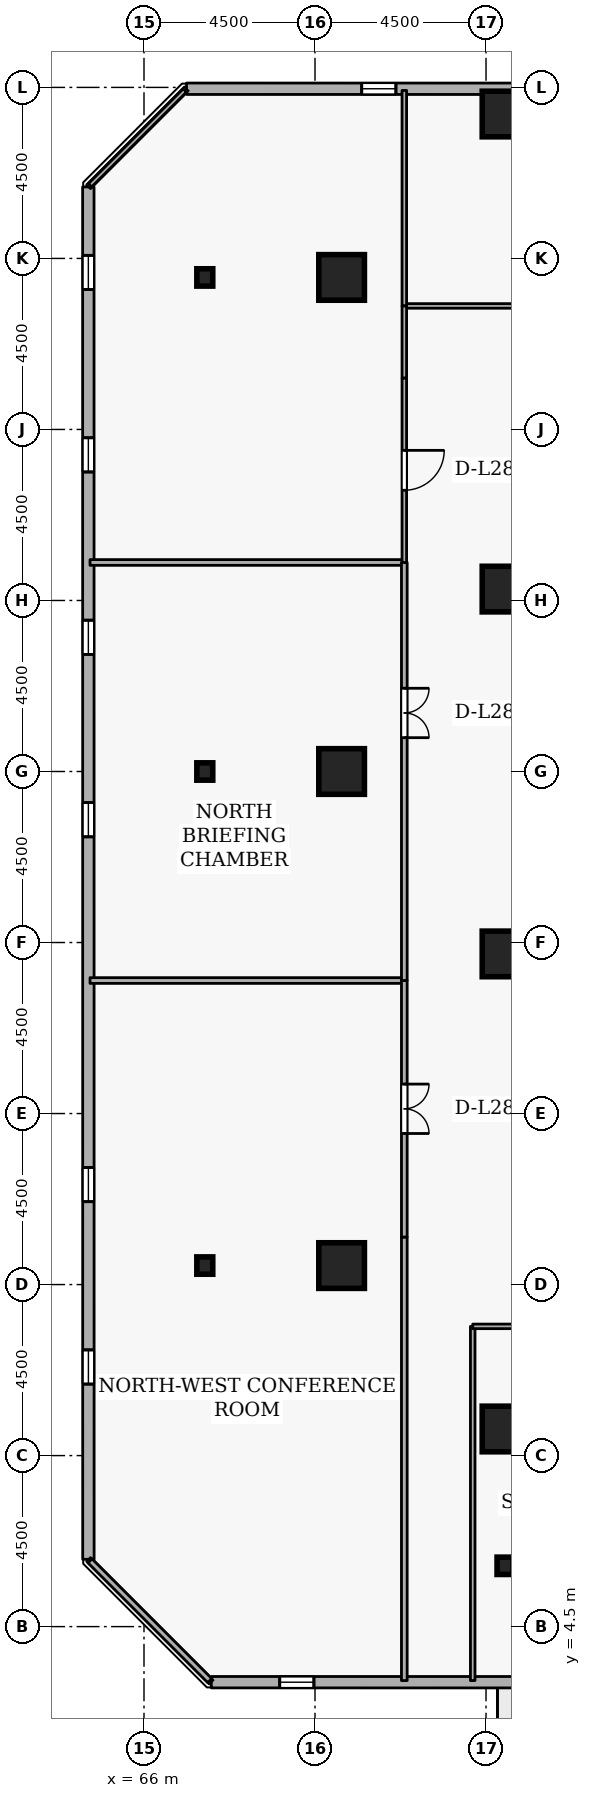
"""IFC4 building model, lengths in metres.
Left out: names, types, materials, properties, quantities, classifications, styles, units other than length and angle.
Written with IfcOpenShell. Run it as: python <this file> out.ifc"""

import sys

from ifc_helpers import new_model, si_unit, direction, frame, frame_2d, origin, origin_2d, place, context, subcontext, project, spatial, rectangle, i_section, extrude, element, fill, save


model = new_model("IFC4")
c1 = context("Model", 3, precision=1e-05, world=origin(), true_north=direction((0.0, 1.0)))
c2 = subcontext(c1, "Body", "Model", "MODEL_VIEW")
j1 = project(units=[si_unit("LENGTHUNIT", "METRE"), si_unit("PLANEANGLEUNIT", "RADIAN")], contexts=[c1])
p1 = place(None, origin())
s1 = spatial("IfcSite", under=j1, at=p1, CompositionType="ELEMENT")
p2 = place(p1, origin())
s2 = spatial("IfcBuilding", under=s1, at=p2, CompositionType="ELEMENT")
p3 = place(p2, frame((0.0, 0.0, 108.9)))
s3 = spatial("IfcBuildingStorey", under=s2, at=p3, CompositionType="ELEMENT", Elevation=108.9)
for number, where, z_axis, x_axis in (
    (1, (75.5, 44.3, 0.0), (0.0, 0.0, 1.0), (1.0, 0.0, 0.0)),
    (2, (71.2, 14.0, 0.0), (0.0, 0.0, 1.0), (1.0, 0.0, 0.0)),
    (3, (71.2, 27.0, 0.0), (0.0, 0.0, 1.0), (1.0, 0.0, 0.0)),
    (4, (71.2, 40.0, 0.0), (0.0, 0.0, 1.0), (1.0, 0.0, 0.0)),
    (5, (75.5, 9.7, 0.0), (0.0, 0.0, 1.0), (1.0, 0.0, 0.0)),
    (6, (75.5, 22.2, 0.0), (0.0, 0.0, 1.0), (1.0, 0.0, 0.0)),
    (7, (75.5, 31.8, 0.0), (0.0, 0.0, 1.0), (1.0, 0.0, 0.0)),
):
    element("IfcColumn", number, at=place(p3, frame(where, z_axis=z_axis, x_axis=x_axis)), inside=s3, PredefinedType="COLUMN", context=c2, shape_type="SweptSolid", body=[
        extrude(rectangle(XDim=1.2, YDim=1.2, at=origin_2d()), origin(), (0.0, 0.0, 1.0), 3.6),
    ])
for number, where, z_axis, x_axis in (
    (8, (67.6, 14.0, 0.0), (0.0, 0.0, 1.0), (1.0, 0.0, 0.0)),
    (9, (67.6, 27.0, 0.0), (0.0, 0.0, 1.0), (1.0, 0.0, 0.0)),
    (10, (67.6, 40.0, 0.0), (0.0, 0.0, 1.0), (1.0, 0.0, 0.0)),
    (11, (75.5, 6.1, 0.0), (0.0, 0.0, 1.0), (1.0, 0.0, 0.0)),
):
    element("IfcColumn", number, at=place(p3, frame(where, z_axis=z_axis, x_axis=x_axis)), inside=s3, PredefinedType="COLUMN", context=c2, shape_type="SweptSolid", body=[
        extrude(i_section(OverallWidth=0.418, OverallDepth=0.456, WebThickness=0.042, FlangeThickness=0.067, FilletRadius=0.015, at=origin_2d()), origin(), (0.0, 0.0, 1.0), 3.6),
    ])
p4 = place(p3, frame((67.771, 3.037, 0.0), z_axis=(0.0, 0.0, 1.0), x_axis=(0.999999998537, -5.4088042e-05, 0.0)))
e12 = element("IfcWall", 12, at=p4, inside=s3, PredefinedType="STANDARD", context=c2, shape_type="SweptSolid", body=[
    extrude(rectangle(XDim=36.11, YDim=0.3, at=frame_2d((18.055, 0.0))), origin(), (0.0, 0.0, 1.0), 2.7),
])
p5 = place(p4, frame((19.405, 0.0, 0.0)))
e13 = element("IfcOpeningElement", 13, at=p5, cuts=e12, PredefinedType="OPENING", context=c2, shape_type="SweptSolid", body=[
    extrude(rectangle(XDim=1.0, YDim=2.08, at=frame_2d((0.5, 1.04))), frame((0.0, 0.16, 0.0), z_axis=(0.0, -1.0, 0.0), x_axis=(1.0, 0.0, 0.0)), (0.0, 0.0, 1.0), 0.32),
])
p6 = place(p4, frame((1.8, 0.0, 0.72)))
e14 = element("IfcOpeningElement", 14, at=p6, cuts=e12, PredefinedType="OPENING", context=c2, shape_type="SweptSolid", body=[
    extrude(rectangle(XDim=0.9, YDim=1.75, at=frame_2d((0.45, 0.875))), frame((0.0, 0.16, 0.0), z_axis=(0.0, -1.0, 0.0), x_axis=(1.0, 0.0, 0.0)), (0.0, 0.0, 1.0), 0.32),
])
p7 = place(p4, frame((11.4, 0.0, 0.72)))
e15 = element("IfcOpeningElement", 15, at=p7, cuts=e12, PredefinedType="OPENING", context=c2, shape_type="SweptSolid", body=[
    extrude(rectangle(XDim=0.9, YDim=1.75, at=frame_2d((0.45, 0.875))), frame((0.0, 0.16, 0.0), z_axis=(0.0, -1.0, 0.0), x_axis=(1.0, 0.0, 0.0)), (0.0, 0.0, 1.0), 0.32),
])
p8 = place(p4, frame((16.2, 0.0, 0.72)))
e16 = element("IfcOpeningElement", 16, at=p8, cuts=e12, PredefinedType="OPENING", context=c2, shape_type="SweptSolid", body=[
    extrude(rectangle(XDim=0.9, YDim=1.75, at=frame_2d((0.45, 0.875))), frame((0.0, 0.16, 0.0), z_axis=(0.0, -1.0, 0.0), x_axis=(1.0, 0.0, 0.0)), (0.0, 0.0, 1.0), 0.32),
])
p9 = place(p4, frame((25.8, 0.0, 0.72)))
e17 = element("IfcOpeningElement", 17, at=p9, cuts=e12, PredefinedType="OPENING", context=c2, shape_type="SweptSolid", body=[
    extrude(rectangle(XDim=0.9, YDim=1.75, at=frame_2d((0.45, 0.875))), frame((0.0, 0.16, 0.0), z_axis=(0.0, -1.0, 0.0), x_axis=(1.0, 0.0, 0.0)), (0.0, 0.0, 1.0), 0.32),
])
p10 = place(p4, frame((30.6, 0.0, 0.72)))
e18 = element("IfcOpeningElement", 18, at=p10, cuts=e12, PredefinedType="OPENING", context=c2, shape_type="SweptSolid", body=[
    extrude(rectangle(XDim=0.9, YDim=1.75, at=frame_2d((0.45, 0.875))), frame((0.0, 0.16, 0.0), z_axis=(0.0, -1.0, 0.0), x_axis=(1.0, 0.0, 0.0)), (0.0, 0.0, 1.0), 0.32),
])
p11 = place(p3, frame((103.229, 44.963, 0.0), z_axis=(0.0, 0.0, 1.0), x_axis=(-0.999999998537, 5.4088042e-05, 0.0)))
e19 = element("IfcWall", 19, at=p11, inside=s3, PredefinedType="STANDARD", context=c2, shape_type="SweptSolid", body=[
    extrude(rectangle(XDim=36.11, YDim=0.3, at=frame_2d((18.055, 0.0))), origin(), (0.0, 0.0, 1.0), 2.7),
])
p12 = place(p11, frame((6.6, 0.0, 0.72)))
e20 = element("IfcOpeningElement", 20, at=p12, cuts=e19, PredefinedType="OPENING", context=c2, shape_type="SweptSolid", body=[
    extrude(rectangle(XDim=0.9, YDim=1.75, at=frame_2d((0.45, 0.875))), frame((0.0, 0.16, 0.0), z_axis=(0.0, -1.0, 0.0), x_axis=(1.0, 0.0, 0.0)), (0.0, 0.0, 1.0), 0.32),
])
p13 = place(p11, frame((11.4, 0.0, 0.72)))
e21 = element("IfcOpeningElement", 21, at=p13, cuts=e19, PredefinedType="OPENING", context=c2, shape_type="SweptSolid", body=[
    extrude(rectangle(XDim=0.9, YDim=1.75, at=frame_2d((0.45, 0.875))), frame((0.0, 0.16, 0.0), z_axis=(0.0, -1.0, 0.0), x_axis=(1.0, 0.0, 0.0)), (0.0, 0.0, 1.0), 0.32),
])
p14 = place(p11, frame((16.2, 0.0, 0.72)))
e22 = element("IfcOpeningElement", 22, at=p14, cuts=e19, PredefinedType="OPENING", context=c2, shape_type="SweptSolid", body=[
    extrude(rectangle(XDim=0.9, YDim=1.75, at=frame_2d((0.45, 0.875))), frame((0.0, 0.16, 0.0), z_axis=(0.0, -1.0, 0.0), x_axis=(1.0, 0.0, 0.0)), (0.0, 0.0, 1.0), 0.32),
])
p15 = place(p11, frame((21.0, 0.0, 0.72)))
e23 = element("IfcOpeningElement", 23, at=p15, cuts=e19, PredefinedType="OPENING", context=c2, shape_type="SweptSolid", body=[
    extrude(rectangle(XDim=0.9, YDim=1.75, at=frame_2d((0.45, 0.875))), frame((0.0, 0.16, 0.0), z_axis=(0.0, -1.0, 0.0), x_axis=(1.0, 0.0, 0.0)), (0.0, 0.0, 1.0), 0.32),
])
p16 = place(p11, frame((30.6, 0.0, 0.72)))
e24 = element("IfcOpeningElement", 24, at=p16, cuts=e19, PredefinedType="OPENING", context=c2, shape_type="SweptSolid", body=[
    extrude(rectangle(XDim=0.9, YDim=1.75, at=frame_2d((0.45, 0.875))), frame((0.0, 0.16, 0.0), z_axis=(0.0, -1.0, 0.0), x_axis=(1.0, 0.0, 0.0)), (0.0, 0.0, 1.0), 0.32),
])
p17 = place(p3, frame((64.535, 42.381, 0.0), z_axis=(0.0, 0.0, 1.0), x_axis=(5.4088042e-05, -0.999999998537, 0.0)))
e25 = element("IfcWall", 25, at=p17, inside=s3, PredefinedType="STANDARD", context=c2, shape_type="SweptSolid", body=[
    extrude(rectangle(XDim=36.11, YDim=0.3, at=frame_2d((18.055, 0.0))), origin(), (0.0, 0.0, 1.0), 2.7),
])
p18 = place(p17, frame((1.8, 0.0, 0.72)))
e26 = element("IfcOpeningElement", 26, at=p18, cuts=e25, PredefinedType="OPENING", context=c2, shape_type="SweptSolid", body=[
    extrude(rectangle(XDim=0.9, YDim=1.75, at=frame_2d((0.45, 0.875))), frame((0.0, 0.16, 0.0), z_axis=(0.0, -1.0, 0.0), x_axis=(1.0, 0.0, 0.0)), (0.0, 0.0, 1.0), 0.32),
])
p19 = place(p17, frame((6.6, 0.0, 0.72)))
e27 = element("IfcOpeningElement", 27, at=p19, cuts=e25, PredefinedType="OPENING", context=c2, shape_type="SweptSolid", body=[
    extrude(rectangle(XDim=0.9, YDim=1.75, at=frame_2d((0.45, 0.875))), frame((0.0, 0.16, 0.0), z_axis=(0.0, -1.0, 0.0), x_axis=(1.0, 0.0, 0.0)), (0.0, 0.0, 1.0), 0.32),
])
p20 = place(p17, frame((11.4, 0.0, 0.72)))
e28 = element("IfcOpeningElement", 28, at=p20, cuts=e25, PredefinedType="OPENING", context=c2, shape_type="SweptSolid", body=[
    extrude(rectangle(XDim=0.9, YDim=1.75, at=frame_2d((0.45, 0.875))), frame((0.0, 0.16, 0.0), z_axis=(0.0, -1.0, 0.0), x_axis=(1.0, 0.0, 0.0)), (0.0, 0.0, 1.0), 0.32),
])
p21 = place(p17, frame((16.2, 0.0, 0.72)))
e29 = element("IfcOpeningElement", 29, at=p21, cuts=e25, PredefinedType="OPENING", context=c2, shape_type="SweptSolid", body=[
    extrude(rectangle(XDim=0.9, YDim=1.75, at=frame_2d((0.45, 0.875))), frame((0.0, 0.16, 0.0), z_axis=(0.0, -1.0, 0.0), x_axis=(1.0, 0.0, 0.0)), (0.0, 0.0, 1.0), 0.32),
])
p22 = place(p17, frame((25.8, 0.0, 0.72)))
e30 = element("IfcOpeningElement", 30, at=p22, cuts=e25, PredefinedType="OPENING", context=c2, shape_type="SweptSolid", body=[
    extrude(rectangle(XDim=0.9, YDim=1.75, at=frame_2d((0.45, 0.875))), frame((0.0, 0.16, 0.0), z_axis=(0.0, -1.0, 0.0), x_axis=(1.0, 0.0, 0.0)), (0.0, 0.0, 1.0), 0.32),
])
p23 = place(p17, frame((30.6, 0.0, 0.72)))
e31 = element("IfcOpeningElement", 31, at=p23, cuts=e25, PredefinedType="OPENING", context=c2, shape_type="SweptSolid", body=[
    extrude(rectangle(XDim=0.9, YDim=1.75, at=frame_2d((0.45, 0.875))), frame((0.0, 0.16, 0.0), z_axis=(0.0, -1.0, 0.0), x_axis=(1.0, 0.0, 0.0)), (0.0, 0.0, 1.0), 0.32),
])
p24 = place(p3, frame((74.65, 3.08, 0.0), z_axis=(0.0, 0.0, 1.0), x_axis=(0.0, 1.0, 0.0)))
e32 = element("IfcWall", 32, at=p24, inside=s3, PredefinedType="PARTITIONING", context=c2, shape_type="SweptSolid", body=[
    extrude(rectangle(XDim=9.32, YDim=0.12, at=frame_2d((4.66, 0.0))), origin(), (0.0, 0.0, 1.0), 3.34),
])
p25 = place(p3, frame((74.65, 12.4, 0.0), z_axis=(0.0, 0.0, 1.0), x_axis=(1.0, 0.0, 0.0)))
e33 = element("IfcWall", 33, at=p25, inside=s3, PredefinedType="PARTITIONING", context=c2, shape_type="SweptSolid", body=[
    extrude(rectangle(XDim=4.802, YDim=0.12, at=frame_2d((2.401, 0.0))), origin(), (0.0, 0.0, 1.0), 3.34),
])
p26 = place(p3, frame((82.2, 39.25, 0.0), z_axis=(0.0, 0.0, 1.0), x_axis=(-1.0, 0.0, 0.0)))
e34 = element("IfcWall", 34, at=p26, inside=s3, PredefinedType="PARTITIONING", context=c2, shape_type="SweptSolid", body=[
    extrude(rectangle(XDim=9.35, YDim=0.12, at=frame_2d((4.675, 0.0))), origin(), (0.0, 0.0, 1.0), 3.34),
])
p27 = place(p26, frame((4.2, 0.0, 0.0)))
e35 = element("IfcOpeningElement", 35, at=p27, cuts=e34, PredefinedType="OPENING", context=c2, shape_type="SweptSolid", body=[
    extrude(rectangle(XDim=0.95, YDim=2.1, at=frame_2d((0.475, 1.05))), frame((0.0, 0.07, 0.0), z_axis=(0.0, -1.0, 0.0), x_axis=(1.0, 0.0, 0.0)), (0.0, 0.0, 1.0), 0.14),
])
p28 = place(p3, frame((72.85, 39.25, 0.0), z_axis=(0.0, 0.0, 1.0), x_axis=(0.0, 1.0, 0.0)))
e36 = element("IfcWall", 36, at=p28, inside=s3, PredefinedType="PARTITIONING", context=c2, shape_type="SweptSolid", body=[
    extrude(rectangle(XDim=5.67, YDim=0.12, at=frame_2d((2.835, 0.0))), origin(), (0.0, 0.0, 1.0), 3.34),
])
p29 = place(p3, frame((72.85, 14.75, 0.0), z_axis=(0.0, 0.0, 1.0), x_axis=(0.0, -1.0, 0.0)))
e37 = element("IfcWall", 37, at=p29, inside=s3, PredefinedType="PARTITIONING", context=c2, shape_type="SweptSolid", body=[
    extrude(rectangle(XDim=11.67, YDim=0.15, at=frame_2d((5.835, 0.0))), origin(), (0.0, 0.0, 1.0), 3.34),
])
p30 = place(p3, frame((67.729, 3.08, 0.0), z_axis=(0.0, 0.0, 1.0), x_axis=(-0.707106781187, 0.707106781187, 0.0)))
e38 = element("IfcWall", 38, at=p30, inside=s3, PredefinedType="PARTITIONING", context=c2, shape_type="SweptSolid", body=[
    extrude(rectangle(XDim=4.454, YDim=0.15, at=frame_2d((2.227, 0.0))), origin(), (0.0, 0.0, 1.0), 3.34),
])
p31 = place(p3, frame((64.58, 21.5, 0.0), z_axis=(0.0, 0.0, 1.0), x_axis=(1.0, 0.0, 0.0)))
e39 = element("IfcWall", 39, at=p31, inside=s3, PredefinedType="PARTITIONING", context=c2, shape_type="SweptSolid", body=[
    extrude(rectangle(XDim=8.27, YDim=0.15, at=frame_2d((4.135, 0.0))), origin(), (0.0, 0.0, 1.0), 3.34),
])
p32 = place(p3, frame((72.85, 21.5, 0.0), z_axis=(0.0, 0.0, 1.0), x_axis=(0.0, -1.0, 0.0)))
e40 = element("IfcWall", 40, at=p32, inside=s3, PredefinedType="PARTITIONING", context=c2, shape_type="SweptSolid", body=[
    extrude(rectangle(XDim=6.75, YDim=0.15, at=frame_2d((3.375, 0.0))), origin(), (0.0, 0.0, 1.0), 3.34),
])
p33 = place(p32, frame((2.725, 0.0, 0.0)))
e41 = element("IfcOpeningElement", 41, at=p33, cuts=e40, PredefinedType="OPENING", context=c2, shape_type="SweptSolid", body=[
    extrude(rectangle(XDim=1.3, YDim=2.12, at=frame_2d((0.65, 1.06))), frame((0.0, 0.085, 0.0), z_axis=(0.0, -1.0, 0.0), x_axis=(1.0, 0.0, 0.0)), (0.0, 0.0, 1.0), 0.17),
])
p34 = place(p3, frame((64.58, 32.5, 0.0), z_axis=(0.0, 0.0, 1.0), x_axis=(1.0, 0.0, 0.0)))
e42 = element("IfcWall", 42, at=p34, inside=s3, PredefinedType="PARTITIONING", context=c2, shape_type="SweptSolid", body=[
    extrude(rectangle(XDim=8.27, YDim=0.15, at=frame_2d((4.135, 0.0))), origin(), (0.0, 0.0, 1.0), 3.34),
])
p35 = place(p3, frame((72.85, 32.5, 0.0), z_axis=(0.0, 0.0, 1.0), x_axis=(0.0, -1.0, 0.0)))
e43 = element("IfcWall", 43, at=p35, inside=s3, PredefinedType="PARTITIONING", context=c2, shape_type="SweptSolid", body=[
    extrude(rectangle(XDim=11.0, YDim=0.15, at=frame_2d((5.5, 0.0))), origin(), (0.0, 0.0, 1.0), 3.34),
])
p36 = place(p35, frame((3.31, 0.0, 0.0)))
e44 = element("IfcOpeningElement", 44, at=p36, cuts=e43, PredefinedType="OPENING", context=c2, shape_type="SweptSolid", body=[
    extrude(rectangle(XDim=1.3, YDim=2.12, at=frame_2d((0.65, 1.06))), frame((0.0, 0.085, 0.0), z_axis=(0.0, -1.0, 0.0), x_axis=(1.0, 0.0, 0.0)), (0.0, 0.0, 1.0), 0.17),
])
p37 = place(p3, frame((64.58, 42.425, 0.0), z_axis=(0.0, 0.0, 1.0), x_axis=(0.707106781187, 0.707106781187, 0.0)))
e45 = element("IfcWall", 45, at=p37, inside=s3, PredefinedType="PARTITIONING", context=c2, shape_type="SweptSolid", body=[
    extrude(rectangle(XDim=3.528, YDim=0.12, at=frame_2d((1.764, 0.0))), origin(), (0.0, 0.0, 1.0), 3.34),
])
p38 = place(p3, frame((72.85, 39.25, 0.0), z_axis=(0.0, 0.0, 1.0), x_axis=(0.0, -1.0, 0.0)))
e46 = element("IfcWall", 46, at=p38, inside=s3, PredefinedType="PARTITIONING", context=c2, shape_type="SweptSolid", body=[
    extrude(rectangle(XDim=1.9, YDim=0.12, at=frame_2d((0.95, 0.0))), origin(), (0.0, 0.0, 1.0), 3.34),
])
p39 = place(p3, frame((72.85, 37.35, 0.0), z_axis=(0.0, 0.0, 1.0), x_axis=(0.0, -1.0, 0.0)))
e47 = element("IfcWall", 47, at=p39, inside=s3, PredefinedType="PARTITIONING", context=c2, shape_type="SweptSolid", body=[
    extrude(rectangle(XDim=4.85, YDim=0.12, at=frame_2d((2.425, 0.0))), origin(), (0.0, 0.0, 1.0), 2.895),
])
p40 = place(p39, frame((1.9, 0.0, 0.0)))
e48 = element("IfcOpeningElement", 48, at=p40, cuts=e47, PredefinedType="OPENING", context=c2, shape_type="SweptSolid", body=[
    extrude(rectangle(XDim=1.05, YDim=2.1, at=frame_2d((0.525, 1.05))), frame((0.0, 0.07, 0.0), z_axis=(0.0, -1.0, 0.0), x_axis=(1.0, 0.0, 0.0)), (0.0, 0.0, 1.0), 0.14),
])
p41 = place(p6, origin())
e49 = element("IfcWindow", 49, at=p41, inside=s3, PartitioningType="SINGLE_PANEL", PredefinedType="WINDOW", context=c2, shape_type="SweptSolid", body=[
    extrude(rectangle(XDim=0.9, YDim=1.75, at=frame_2d((0.45, 0.875))), frame((0.0, 0.03, 0.0), z_axis=(0.0, -1.0, 0.0), x_axis=(1.0, 0.0, 0.0)), (0.0, 0.0, 1.0), 0.06),
])
fill(e14, e49)
p42 = place(p16, origin())
e50 = element("IfcWindow", 50, at=p42, inside=s3, PartitioningType="SINGLE_PANEL", PredefinedType="WINDOW", context=c2, shape_type="SweptSolid", body=[
    extrude(rectangle(XDim=0.9, YDim=1.75, at=frame_2d((0.45, 0.875))), frame((0.0, 0.03, 0.0), z_axis=(0.0, -1.0, 0.0), x_axis=(1.0, 0.0, 0.0)), (0.0, 0.0, 1.0), 0.06),
])
fill(e24, e50)
p43 = place(p18, origin())
e51 = element("IfcWindow", 51, at=p43, inside=s3, PartitioningType="SINGLE_PANEL", PredefinedType="WINDOW", context=c2, shape_type="SweptSolid", body=[
    extrude(rectangle(XDim=0.9, YDim=1.75, at=frame_2d((0.45, 0.875))), frame((0.0, 0.03, 0.0), z_axis=(0.0, -1.0, 0.0), x_axis=(1.0, 0.0, 0.0)), (0.0, 0.0, 1.0), 0.06),
])
fill(e26, e51)
p44 = place(p19, origin())
e52 = element("IfcWindow", 52, at=p44, inside=s3, PartitioningType="SINGLE_PANEL", PredefinedType="WINDOW", context=c2, shape_type="SweptSolid", body=[
    extrude(rectangle(XDim=0.9, YDim=1.75, at=frame_2d((0.45, 0.875))), frame((0.0, 0.03, 0.0), z_axis=(0.0, -1.0, 0.0), x_axis=(1.0, 0.0, 0.0)), (0.0, 0.0, 1.0), 0.06),
])
fill(e27, e52)
p45 = place(p20, origin())
e53 = element("IfcWindow", 53, at=p45, inside=s3, PartitioningType="SINGLE_PANEL", PredefinedType="WINDOW", context=c2, shape_type="SweptSolid", body=[
    extrude(rectangle(XDim=0.9, YDim=1.75, at=frame_2d((0.45, 0.875))), frame((0.0, 0.03, 0.0), z_axis=(0.0, -1.0, 0.0), x_axis=(1.0, 0.0, 0.0)), (0.0, 0.0, 1.0), 0.06),
])
fill(e28, e53)
p46 = place(p21, origin())
e54 = element("IfcWindow", 54, at=p46, inside=s3, PartitioningType="SINGLE_PANEL", PredefinedType="WINDOW", context=c2, shape_type="SweptSolid", body=[
    extrude(rectangle(XDim=0.9, YDim=1.75, at=frame_2d((0.45, 0.875))), frame((0.0, 0.03, 0.0), z_axis=(0.0, -1.0, 0.0), x_axis=(1.0, 0.0, 0.0)), (0.0, 0.0, 1.0), 0.06),
])
fill(e29, e54)
p47 = place(p22, origin())
e55 = element("IfcWindow", 55, at=p47, inside=s3, PartitioningType="SINGLE_PANEL", PredefinedType="WINDOW", context=c2, shape_type="SweptSolid", body=[
    extrude(rectangle(XDim=0.9, YDim=1.75, at=frame_2d((0.45, 0.875))), frame((0.0, 0.03, 0.0), z_axis=(0.0, -1.0, 0.0), x_axis=(1.0, 0.0, 0.0)), (0.0, 0.0, 1.0), 0.06),
])
fill(e30, e55)
p48 = place(p23, origin())
e56 = element("IfcWindow", 56, at=p48, inside=s3, PartitioningType="SINGLE_PANEL", PredefinedType="WINDOW", context=c2, shape_type="SweptSolid", body=[
    extrude(rectangle(XDim=0.9, YDim=1.75, at=frame_2d((0.45, 0.875))), frame((0.0, 0.03, 0.0), z_axis=(0.0, -1.0, 0.0), x_axis=(1.0, 0.0, 0.0)), (0.0, 0.0, 1.0), 0.06),
])
fill(e31, e56)
p49 = place(p33, origin())
e57 = element("IfcDoor", 57, at=p49, inside=s3, OperationType="DOUBLE_DOOR_SINGLE_SWING", PredefinedType="DOOR", context=c2, shape_type="SweptSolid", body=[
    extrude(rectangle(XDim=1.3, YDim=2.12, at=frame_2d((0.65, 1.06))), frame((0.0, 0.025, 0.0), z_axis=(0.0, -1.0, 0.0), x_axis=(1.0, 0.0, 0.0)), (0.0, 0.0, 1.0), 0.05),
])
fill(e41, e57)
p50 = place(p36, origin())
e58 = element("IfcDoor", 58, at=p50, inside=s3, OperationType="DOUBLE_DOOR_SINGLE_SWING", PredefinedType="DOOR", context=c2, shape_type="SweptSolid", body=[
    extrude(rectangle(XDim=1.3, YDim=2.12, at=frame_2d((0.65, 1.06))), frame((0.0, 0.025, 0.0), z_axis=(0.0, -1.0, 0.0), x_axis=(1.0, 0.0, 0.0)), (0.0, 0.0, 1.0), 0.05),
])
fill(e44, e58)
p51 = place(p40, origin())
e59 = element("IfcDoor", 59, at=p51, inside=s3, OperationType="SINGLE_SWING_LEFT", PredefinedType="DOOR", context=c2, shape_type="SweptSolid", body=[
    extrude(rectangle(XDim=1.05, YDim=2.1, at=frame_2d((0.525, 1.05))), frame((0.0, 0.025, 0.0), z_axis=(0.0, -1.0, 0.0), x_axis=(1.0, 0.0, 0.0)), (0.0, 0.0, 1.0), 0.05),
])
fill(e48, e59)
save(model, sys.argv[1])
